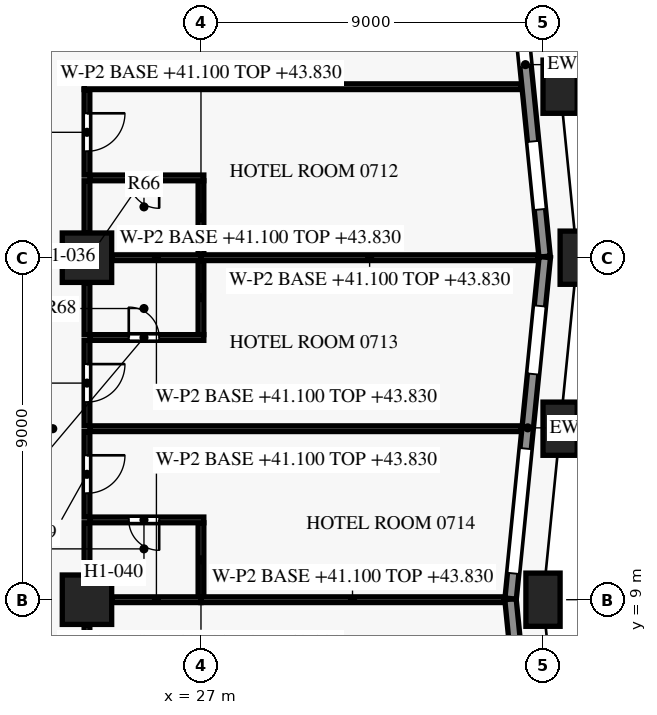
"""IFC4 building model, lengths in metres.
Left out: names, types, materials, properties, quantities, classifications, styles, units other than length and angle.
Written with IfcOpenShell. Run it as: python <this file> out.ifc"""

import sys

from ifc_helpers import new_model, si_unit, direction, frame, frame_2d, origin, origin_2d, place, context, subcontext, project, spatial, rectangle, extrude, element, fill, save


model = new_model("IFC4")
c1 = context("Model", 3, precision=1e-05, world=origin(), true_north=direction((0.0, 1.0)))
c2 = subcontext(c1, "Body", "Model", "MODEL_VIEW")
j1 = project(units=[si_unit("LENGTHUNIT", "METRE"), si_unit("PLANEANGLEUNIT", "RADIAN")], contexts=[c1])
p1 = place(None, origin())
s1 = spatial("IfcSite", under=j1, at=p1, CompositionType="ELEMENT")
p2 = place(p1, origin())
s2 = spatial("IfcBuilding", under=s1, at=p2, CompositionType="ELEMENT")
p3 = place(p2, frame((0.0, 0.0, 41.1)))
s3 = spatial("IfcBuildingStorey", under=s2, at=p3, CompositionType="ELEMENT", Elevation=41.1)
for number, where, z_axis, x_axis in (
    (1, (36.0, 9.0, 0.0), (0.0, 0.0, 1.0), (0.0, 1.0, 0.0)),
    (2, (36.45, 13.5, 0.0), (0.0, 0.0, 1.0), (0.1, 0.995, 0.0)),
    (3, (36.9, 18.0, 0.0), (0.0, 0.0, 1.0), (0.0, 1.0, 0.0)),
    (4, (36.45, 22.5, 0.0), (0.0, 0.0, 1.0), (-0.1, 0.995, 0.0)),
):
    element("IfcColumn", number, at=place(p3, frame(where, z_axis=z_axis, x_axis=x_axis)), inside=s3, PredefinedType="COLUMN", context=c2, shape_type="SweptSolid", body=[
        extrude(rectangle(XDim=0.9, YDim=1.4, at=origin_2d()), origin(), (0.0, 0.0, 1.0), 3.6),
    ])
for number, where, z_axis, x_axis in (
    (5, (24.0, 9.0, 0.0), (0.0, 0.0, 1.0), (1.0, 0.0, 0.0)),
    (6, (24.0, 18.0, 0.0), (0.0, 0.0, 1.0), (1.0, 0.0, 0.0)),
):
    element("IfcColumn", number, at=place(p3, frame(where, z_axis=z_axis, x_axis=x_axis)), inside=s3, PredefinedType="COLUMN", context=c2, shape_type="SweptSolid", body=[
        extrude(rectangle(XDim=1.3, YDim=1.3, at=origin_2d()), origin(), (0.0, 0.0, 1.0), 3.6),
    ])
p4 = place(p3, frame((35.144, 9.015, 0.0), z_axis=(0.0, 0.0, 1.0), x_axis=(0.099462600847, -0.995041301169, 0.0)))
e7 = element("IfcWall", 7, at=p4, inside=s3, PredefinedType="SOLIDWALL", context=c2, shape_type="SweptSolid", body=[
    extrude(rectangle(XDim=3.527, YDim=0.3, at=frame_2d((1.764, 0.0))), origin(), (0.0, 0.0, 1.0), 2.95),
])
p5 = place(p3, frame((36.047, 18.015, 0.0), z_axis=(0.0, 0.0, 1.0), x_axis=(-0.099522457379, -0.995035316196, 0.0)))
e8 = element("IfcWall", 8, at=p5, inside=s3, PredefinedType="SOLIDWALL", context=c2, shape_type="SweptSolid", body=[
    extrude(rectangle(XDim=9.03, YDim=0.3, at=frame_2d((4.515, 0.0))), origin(), (0.0, 0.0, 1.0), 2.95),
])
p6 = place(p5, frame((1.291, 0.0, 0.75)))
e9 = element("IfcOpeningElement", 9, at=p6, cuts=e8, PredefinedType="OPENING", context=c2, shape_type="SweptSolid", body=[
    extrude(rectangle(XDim=1.8, YDim=1.8, at=frame_2d((0.9, 0.9))), frame((0.0, 0.16, 0.0), z_axis=(0.0, -1.0, 0.0), x_axis=(1.0, 0.0, 0.0)), (0.0, 0.0, 1.0), 0.32),
])
p7 = place(p5, frame((5.064, 0.0, 0.15)))
e10 = element("IfcOpeningElement", 10, at=p7, cuts=e8, PredefinedType="OPENING", context=c2, shape_type="SweptSolid", body=[
    extrude(rectangle(XDim=3.3, YDim=2.4, at=frame_2d((1.65, 1.2))), frame((0.0, 0.16, 0.0), z_axis=(0.0, -1.0, 0.0), x_axis=(1.0, 0.0, 0.0)), (0.0, 0.0, 1.0), 0.32),
])
p8 = place(p3, frame((35.033, 28.132, 0.0), z_axis=(0.0, 0.0, 1.0), x_axis=(0.099487051997, -0.995038856771, 0.0)))
e11 = element("IfcWall", 11, at=p8, inside=s3, PredefinedType="SOLIDWALL", context=c2, shape_type="SweptSolid", body=[
    extrude(rectangle(XDim=10.152, YDim=0.3, at=frame_2d((5.076, 0.0))), origin(), (0.0, 0.0, 1.0), 2.95),
])
p9 = place(p8, frame((1.833, 0.0, 0.15)))
e12 = element("IfcOpeningElement", 12, at=p9, cuts=e11, PredefinedType="OPENING", context=c2, shape_type="SweptSolid", body=[
    extrude(rectangle(XDim=3.3, YDim=2.4, at=frame_2d((1.65, 1.2))), frame((0.0, 0.16, 0.0), z_axis=(0.0, -1.0, 0.0), x_axis=(1.0, 0.0, 0.0)), (0.0, 0.0, 1.0), 0.32),
])
p10 = place(p8, frame((7.106, 0.0, 0.75)))
e13 = element("IfcOpeningElement", 13, at=p10, cuts=e11, PredefinedType="OPENING", context=c2, shape_type="SweptSolid", body=[
    extrude(rectangle(XDim=1.8, YDim=1.8, at=frame_2d((0.9, 0.9))), frame((0.0, 0.16, 0.0), z_axis=(0.0, -1.0, 0.0), x_axis=(1.0, 0.0, 0.0)), (0.0, 0.0, 1.0), 0.32),
])
p11 = place(p3, frame((24.0, 8.345, 0.0), z_axis=(0.0, 0.0, 1.0), x_axis=(0.0, -1.0, 0.0)))
e14 = element("IfcWall", 14, at=p11, inside=s3, PredefinedType="PARTITIONING", context=c2, shape_type="SweptSolid", body=[
    extrude(rectangle(XDim=1.07, YDim=0.15, at=frame_2d((0.535, 0.0))), origin(), (0.0, 0.0, 1.0), 2.58),
])
p12 = place(p3, frame((27.0, 9.0, 0.0), z_axis=(0.0, 0.0, 1.0), x_axis=(-1.0, 0.0, 0.0)))
e15 = element("IfcWall", 15, at=p12, inside=s3, PredefinedType="PARTITIONING", context=c2, shape_type="SweptSolid", body=[
    extrude(rectangle(XDim=2.345, YDim=0.15, at=frame_2d((1.172, 0.0))), origin(), (0.0, 0.0, 1.0), 2.73),
])
p13 = place(p3, frame((34.975, 9.0, 0.0), z_axis=(0.0, 0.0, 1.0), x_axis=(-1.0, 0.0, 0.0)))
e16 = element("IfcWall", 16, at=p13, inside=s3, PredefinedType="PARTITIONING", context=c2, shape_type="SweptSolid", body=[
    extrude(rectangle(XDim=7.975, YDim=0.15, at=frame_2d((3.988, 0.0))), origin(), (0.0, 0.0, 1.0), 2.73),
])
p14 = place(p3, frame((27.0, 9.075, 0.0), z_axis=(0.0, 0.0, 1.0), x_axis=(0.0, 1.0, 0.0)))
e17 = element("IfcWall", 17, at=p14, inside=s3, PredefinedType="PARTITIONING", context=c2, shape_type="SweptSolid", body=[
    extrude(rectangle(XDim=1.95, YDim=0.15, at=frame_2d((0.975, 0.0))), origin(), (0.0, 0.0, 1.0), 2.73),
])
p15 = place(p3, frame((24.0, 11.025, 0.0), z_axis=(0.0, 0.0, 1.0), x_axis=(0.0, -1.0, 0.0)))
e18 = element("IfcWall", 18, at=p15, inside=s3, PredefinedType="PARTITIONING", context=c2, shape_type="SweptSolid", body=[
    extrude(rectangle(XDim=1.37, YDim=0.15, at=frame_2d((0.685, 0.0))), origin(), (0.0, 0.0, 1.0), 2.58),
])
p16 = place(p3, frame((27.075, 11.1, 0.0), z_axis=(0.0, 0.0, 1.0), x_axis=(-1.0, 0.0, 0.0)))
e19 = element("IfcWall", 19, at=p16, inside=s3, PredefinedType="PARTITIONING", context=c2, shape_type="SweptSolid", body=[
    extrude(rectangle(XDim=3.0, YDim=0.15, at=frame_2d((1.5, 0.0))), origin(), (0.0, 0.0, 1.0), 2.58),
])
p17 = place(p16, frame((1.175, 0.0, 0.0)))
e20 = element("IfcOpeningElement", 20, at=p17, cuts=e19, PredefinedType="OPENING", context=c2, shape_type="SweptSolid", body=[
    extrude(rectangle(XDim=0.8, YDim=2.1, at=frame_2d((0.4, 1.05))), frame((0.0, 0.085, 0.0), z_axis=(0.0, -1.0, 0.0), x_axis=(1.0, 0.0, 0.0)), (0.0, 0.0, 1.0), 0.17),
])
p18 = place(p3, frame((24.0, 13.425, 0.0), z_axis=(0.0, 0.0, 1.0), x_axis=(0.0, -1.0, 0.0)))
e21 = element("IfcWall", 21, at=p18, inside=s3, PredefinedType="PARTITIONING", context=c2, shape_type="SweptSolid", body=[
    extrude(rectangle(XDim=2.25, YDim=0.15, at=frame_2d((1.125, 0.0))), origin(), (0.0, 0.0, 1.0), 2.58),
])
p19 = place(p18, frame((0.625, 0.0, 0.0)))
e22 = element("IfcOpeningElement", 22, at=p19, cuts=e21, PredefinedType="OPENING", context=c2, shape_type="SweptSolid", body=[
    extrude(rectangle(XDim=1.0, YDim=2.1, at=frame_2d((0.5, 1.05))), frame((0.0, 0.085, 0.0), z_axis=(0.0, -1.0, 0.0), x_axis=(1.0, 0.0, 0.0)), (0.0, 0.0, 1.0), 0.17),
])
p20 = place(p3, frame((35.425, 13.5, 0.0), z_axis=(0.0, 0.0, 1.0), x_axis=(-1.0, 0.0, 0.0)))
e23 = element("IfcWall", 23, at=p20, inside=s3, PredefinedType="PARTITIONING", context=c2, shape_type="SweptSolid", body=[
    extrude(rectangle(XDim=11.35, YDim=0.15, at=frame_2d((5.675, 0.0))), origin(), (0.0, 0.0, 1.0), 2.58),
])
p21 = place(p3, frame((24.0, 15.825, 0.0), z_axis=(0.0, 0.0, 1.0), x_axis=(0.0, -1.0, 0.0)))
e24 = element("IfcWall", 24, at=p21, inside=s3, PredefinedType="PARTITIONING", context=c2, shape_type="SweptSolid", body=[
    extrude(rectangle(XDim=2.25, YDim=0.15, at=frame_2d((1.125, 0.0))), origin(), (0.0, 0.0, 1.0), 2.58),
])
p22 = place(p21, frame((0.625, 0.0, 0.0)))
e25 = element("IfcOpeningElement", 25, at=p22, cuts=e24, PredefinedType="OPENING", context=c2, shape_type="SweptSolid", body=[
    extrude(rectangle(XDim=1.0, YDim=2.1, at=frame_2d((0.5, 1.05))), frame((0.0, 0.085, 0.0), z_axis=(0.0, -1.0, 0.0), x_axis=(1.0, 0.0, 0.0)), (0.0, 0.0, 1.0), 0.17),
])
p23 = place(p3, frame((24.075, 15.9, 0.0), z_axis=(0.0, 0.0, 1.0), x_axis=(1.0, 0.0, 0.0)))
e26 = element("IfcWall", 26, at=p23, inside=s3, PredefinedType="PARTITIONING", context=c2, shape_type="SweptSolid", body=[
    extrude(rectangle(XDim=3.0, YDim=0.15, at=frame_2d((1.5, 0.0))), origin(), (0.0, 0.0, 1.0), 2.58),
])
p24 = place(p23, frame((1.025, 0.0, 0.0)))
e27 = element("IfcOpeningElement", 27, at=p24, cuts=e26, PredefinedType="OPENING", context=c2, shape_type="SweptSolid", body=[
    extrude(rectangle(XDim=0.8, YDim=2.1, at=frame_2d((0.4, 1.05))), frame((0.0, 0.085, 0.0), z_axis=(0.0, -1.0, 0.0), x_axis=(1.0, 0.0, 0.0)), (0.0, 0.0, 1.0), 0.17),
])
p25 = place(p3, frame((27.0, 15.975, 0.0), z_axis=(0.0, 0.0, 1.0), x_axis=(0.0, 1.0, 0.0)))
e28 = element("IfcWall", 28, at=p25, inside=s3, PredefinedType="PARTITIONING", context=c2, shape_type="SweptSolid", body=[
    extrude(rectangle(XDim=1.95, YDim=0.15, at=frame_2d((0.975, 0.0))), origin(), (0.0, 0.0, 1.0), 2.73),
])
p26 = place(p3, frame((24.0, 17.345, 0.0), z_axis=(0.0, 0.0, 1.0), x_axis=(0.0, -1.0, 0.0)))
e29 = element("IfcWall", 29, at=p26, inside=s3, PredefinedType="PARTITIONING", context=c2, shape_type="SweptSolid", body=[
    extrude(rectangle(XDim=1.37, YDim=0.15, at=frame_2d((0.685, 0.0))), origin(), (0.0, 0.0, 1.0), 2.58),
])
p27 = place(p3, frame((23.33, 18.0, 0.0), z_axis=(0.0, 0.0, 1.0), x_axis=(-1.0, 0.0, 0.0)))
e30 = element("IfcWall", 30, at=p27, inside=s3, PredefinedType="PARTITIONING", context=c2, shape_type="SweptSolid", body=[
    extrude(rectangle(XDim=5.43, YDim=0.1, at=frame_2d((2.715, 0.0))), origin(), (0.0, 0.0, 1.0), 2.73),
])
p28 = place(p3, frame((27.0, 18.0, 0.0), z_axis=(0.0, 0.0, 1.0), x_axis=(-1.0, 0.0, 0.0)))
e31 = element("IfcWall", 31, at=p28, inside=s3, PredefinedType="PARTITIONING", context=c2, shape_type="SweptSolid", body=[
    extrude(rectangle(XDim=2.345, YDim=0.15, at=frame_2d((1.172, 0.0))), origin(), (0.0, 0.0, 1.0), 2.73),
])
p29 = place(p3, frame((35.875, 18.0, 0.0), z_axis=(0.0, 0.0, 1.0), x_axis=(-1.0, 0.0, 0.0)))
e32 = element("IfcWall", 32, at=p29, inside=s3, PredefinedType="PARTITIONING", context=c2, shape_type="SweptSolid", body=[
    extrude(rectangle(XDim=8.875, YDim=0.15, at=frame_2d((4.438, 0.0))), origin(), (0.0, 0.0, 1.0), 2.73),
])
p30 = place(p3, frame((27.0, 18.075, 0.0), z_axis=(0.0, 0.0, 1.0), x_axis=(0.0, 1.0, 0.0)))
e33 = element("IfcWall", 33, at=p30, inside=s3, PredefinedType="PARTITIONING", context=c2, shape_type="SweptSolid", body=[
    extrude(rectangle(XDim=1.95, YDim=0.15, at=frame_2d((0.975, 0.0))), origin(), (0.0, 0.0, 1.0), 2.73),
])
p31 = place(p3, frame((24.0, 20.025, 0.0), z_axis=(0.0, 0.0, 1.0), x_axis=(0.0, -1.0, 0.0)))
e34 = element("IfcWall", 34, at=p31, inside=s3, PredefinedType="PARTITIONING", context=c2, shape_type="SweptSolid", body=[
    extrude(rectangle(XDim=1.37, YDim=0.15, at=frame_2d((0.685, 0.0))), origin(), (0.0, 0.0, 1.0), 2.58),
])
p32 = place(p3, frame((27.075, 20.1, 0.0), z_axis=(0.0, 0.0, 1.0), x_axis=(-1.0, 0.0, 0.0)))
e35 = element("IfcWall", 35, at=p32, inside=s3, PredefinedType="PARTITIONING", context=c2, shape_type="SweptSolid", body=[
    extrude(rectangle(XDim=3.0, YDim=0.15, at=frame_2d((1.5, 0.0))), origin(), (0.0, 0.0, 1.0), 2.58),
])
p33 = place(p32, frame((1.175, 0.0, 0.0)))
e36 = element("IfcOpeningElement", 36, at=p33, cuts=e35, PredefinedType="OPENING", context=c2, shape_type="SweptSolid", body=[
    extrude(rectangle(XDim=0.8, YDim=2.1, at=frame_2d((0.4, 1.05))), frame((0.0, 0.085, 0.0), z_axis=(0.0, -1.0, 0.0), x_axis=(1.0, 0.0, 0.0)), (0.0, 0.0, 1.0), 0.17),
])
p34 = place(p3, frame((24.0, 22.425, 0.0), z_axis=(0.0, 0.0, 1.0), x_axis=(0.0, -1.0, 0.0)))
e37 = element("IfcWall", 37, at=p34, inside=s3, PredefinedType="PARTITIONING", context=c2, shape_type="SweptSolid", body=[
    extrude(rectangle(XDim=2.25, YDim=0.15, at=frame_2d((1.125, 0.0))), origin(), (0.0, 0.0, 1.0), 2.58),
])
p35 = place(p34, frame((0.625, 0.0, 0.0)))
e38 = element("IfcOpeningElement", 38, at=p35, cuts=e37, PredefinedType="OPENING", context=c2, shape_type="SweptSolid", body=[
    extrude(rectangle(XDim=1.0, YDim=2.1, at=frame_2d((0.5, 1.05))), frame((0.0, 0.085, 0.0), z_axis=(0.0, -1.0, 0.0), x_axis=(1.0, 0.0, 0.0)), (0.0, 0.0, 1.0), 0.17),
])
p36 = place(p3, frame((35.425, 22.5, 0.0), z_axis=(0.0, 0.0, 1.0), x_axis=(-1.0, 0.0, 0.0)))
e39 = element("IfcWall", 39, at=p36, inside=s3, PredefinedType="PARTITIONING", context=c2, shape_type="SweptSolid", body=[
    extrude(rectangle(XDim=11.5, YDim=0.15, at=frame_2d((5.75, 0.0))), origin(), (0.0, 0.0, 1.0), 2.58),
])
p37 = place(p6, origin())
e40 = element("IfcWindow", 40, at=p37, inside=s3, PartitioningType="SINGLE_PANEL", PredefinedType="WINDOW", context=c2, shape_type="SweptSolid", body=[
    extrude(rectangle(XDim=1.8, YDim=1.8, at=frame_2d((0.9, 0.9))), frame((0.0, 0.03, 0.0), z_axis=(0.0, -1.0, 0.0), x_axis=(1.0, 0.0, 0.0)), (0.0, 0.0, 1.0), 0.06),
])
fill(e9, e40)
p38 = place(p7, origin())
e41 = element("IfcWindow", 41, at=p38, inside=s3, PartitioningType="SINGLE_PANEL", PredefinedType="WINDOW", context=c2, shape_type="SweptSolid", body=[
    extrude(rectangle(XDim=3.3, YDim=2.4, at=frame_2d((1.65, 1.2))), frame((0.0, 0.03, 0.0), z_axis=(0.0, -1.0, 0.0), x_axis=(1.0, 0.0, 0.0)), (0.0, 0.0, 1.0), 0.06),
])
fill(e10, e41)
p39 = place(p9, origin())
e42 = element("IfcWindow", 42, at=p39, inside=s3, PartitioningType="SINGLE_PANEL", PredefinedType="WINDOW", context=c2, shape_type="SweptSolid", body=[
    extrude(rectangle(XDim=3.3, YDim=2.4, at=frame_2d((1.65, 1.2))), frame((0.0, 0.03, 0.0), z_axis=(0.0, -1.0, 0.0), x_axis=(1.0, 0.0, 0.0)), (0.0, 0.0, 1.0), 0.06),
])
fill(e12, e42)
p40 = place(p10, origin())
e43 = element("IfcWindow", 43, at=p40, inside=s3, PartitioningType="SINGLE_PANEL", PredefinedType="WINDOW", context=c2, shape_type="SweptSolid", body=[
    extrude(rectangle(XDim=1.8, YDim=1.8, at=frame_2d((0.9, 0.9))), frame((0.0, 0.03, 0.0), z_axis=(0.0, -1.0, 0.0), x_axis=(1.0, 0.0, 0.0)), (0.0, 0.0, 1.0), 0.06),
])
fill(e13, e43)
p41 = place(p35, origin())
e44 = element("IfcDoor", 44, at=p41, inside=s3, OperationType="SINGLE_SWING_LEFT", PredefinedType="DOOR", context=c2, shape_type="SweptSolid", body=[
    extrude(rectangle(XDim=1.0, YDim=2.1, at=frame_2d((0.5, 1.05))), frame((0.0, 0.025, 0.0), z_axis=(0.0, -1.0, 0.0), x_axis=(1.0, 0.0, 0.0)), (0.0, 0.0, 1.0), 0.05),
])
fill(e38, e44)
p42 = place(p33, origin())
e45 = element("IfcDoor", 45, at=p42, inside=s3, OperationType="SINGLE_SWING_LEFT", PredefinedType="DOOR", context=c2, shape_type="SweptSolid", body=[
    extrude(rectangle(XDim=0.8, YDim=2.1, at=frame_2d((0.4, 1.05))), frame((0.0, 0.025, 0.0), z_axis=(0.0, -1.0, 0.0), x_axis=(1.0, 0.0, 0.0)), (0.0, 0.0, 1.0), 0.05),
])
fill(e36, e45)
p43 = place(p22, origin())
e46 = element("IfcDoor", 46, at=p43, inside=s3, OperationType="SINGLE_SWING_LEFT", PredefinedType="DOOR", context=c2, shape_type="SweptSolid", body=[
    extrude(rectangle(XDim=1.0, YDim=2.1, at=frame_2d((0.5, 1.05))), frame((0.0, 0.025, 0.0), z_axis=(0.0, -1.0, 0.0), x_axis=(1.0, 0.0, 0.0)), (0.0, 0.0, 1.0), 0.05),
])
fill(e25, e46)
p44 = place(p24, origin())
e47 = element("IfcDoor", 47, at=p44, inside=s3, OperationType="SINGLE_SWING_LEFT", PredefinedType="DOOR", context=c2, shape_type="SweptSolid", body=[
    extrude(rectangle(XDim=0.8, YDim=2.1, at=frame_2d((0.4, 1.05))), frame((0.0, 0.025, 0.0), z_axis=(0.0, -1.0, 0.0), x_axis=(1.0, 0.0, 0.0)), (0.0, 0.0, 1.0), 0.05),
])
fill(e27, e47)
p45 = place(p19, origin())
e48 = element("IfcDoor", 48, at=p45, inside=s3, OperationType="SINGLE_SWING_LEFT", PredefinedType="DOOR", context=c2, shape_type="SweptSolid", body=[
    extrude(rectangle(XDim=1.0, YDim=2.1, at=frame_2d((0.5, 1.05))), frame((0.0, 0.025, 0.0), z_axis=(0.0, -1.0, 0.0), x_axis=(1.0, 0.0, 0.0)), (0.0, 0.0, 1.0), 0.05),
])
fill(e22, e48)
p46 = place(p17, origin())
e49 = element("IfcDoor", 49, at=p46, inside=s3, OperationType="SINGLE_SWING_LEFT", PredefinedType="DOOR", context=c2, shape_type="SweptSolid", body=[
    extrude(rectangle(XDim=0.8, YDim=2.1, at=frame_2d((0.4, 1.05))), frame((0.0, 0.025, 0.0), z_axis=(0.0, -1.0, 0.0), x_axis=(1.0, 0.0, 0.0)), (0.0, 0.0, 1.0), 0.05),
])
fill(e20, e49)
save(model, sys.argv[1])
